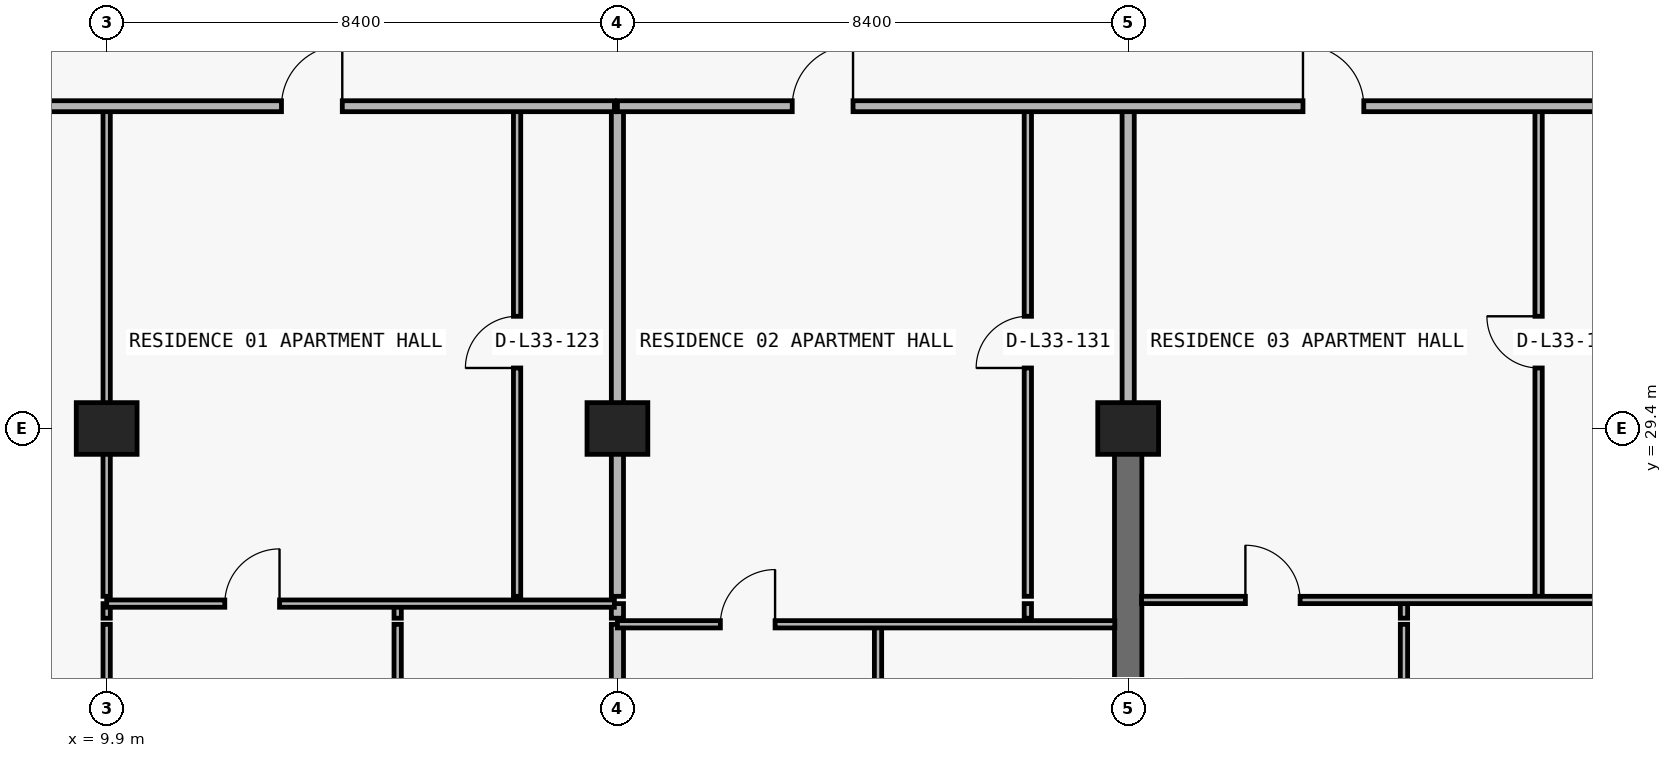
"""IFC4 building model, lengths in metres.
Left out: names, types, materials, properties, quantities, classifications, styles, units other than length and angle.
Written with IfcOpenShell. Run it as: python <this file> out.ifc"""

import sys

from ifc_helpers import new_model, si_unit, direction, frame, frame_2d, origin, origin_2d, place, context, subcontext, project, spatial, rectangle, extrude, element, fill, save


model = new_model("IFC4")
c1 = context("Model", 3, precision=1e-05, world=origin(), true_north=direction((0.0, 1.0)))
c2 = subcontext(c1, "Body", "Model", "MODEL_VIEW")
j1 = project(units=[si_unit("LENGTHUNIT", "METRE"), si_unit("PLANEANGLEUNIT", "RADIAN")], contexts=[c1])
p1 = place(None, origin())
s1 = spatial("IfcSite", under=j1, at=p1, CompositionType="ELEMENT")
p2 = place(p1, origin())
s2 = spatial("IfcBuilding", under=s1, at=p2, CompositionType="ELEMENT")
p3 = place(p2, frame((0.0, 0.0, 122.4)))
s3 = spatial("IfcBuildingStorey", under=s2, at=p3, CompositionType="ELEMENT", Elevation=122.4)
for number, where, z_axis, x_axis in (
    (1, (9.9, 29.4, 0.0), (0.0, 0.0, 1.0), (1.0, 0.0, 0.0)),
    (2, (18.3, 29.4, 0.0), (0.0, 0.0, 1.0), (1.0, 0.0, 0.0)),
    (3, (26.7, 29.4, 0.0), (0.0, 0.0, 1.0), (1.0, 0.0, 0.0)),
):
    element("IfcColumn", number, at=place(p3, frame(where, z_axis=z_axis, x_axis=x_axis)), inside=s3, PredefinedType="COLUMN", context=c2, shape_type="SweptSolid", body=[
        extrude(rectangle(XDim=1.0, YDim=0.85, at=origin_2d()), origin(), (0.0, 0.0, 1.0), 3.05),
    ])
p4 = place(p3, frame((26.7, 20.8, 0.0), z_axis=(0.0, 0.0, 1.0), x_axis=(0.0, 1.0, 0.0)))
e4 = element("IfcWall", 4, at=p4, inside=s3, PredefinedType="SHEAR", context=c2, shape_type="SweptSolid", body=[
    extrude(rectangle(XDim=8.6, YDim=0.45, at=frame_2d((4.3, 0.0))), origin(), (0.0, 0.0, 1.0), 3.05),
])
p5 = place(p3, frame((9.9, 21.49, 0.0), z_axis=(0.0, 0.0, 1.0), x_axis=(0.0, 1.0, 0.0)))
e5 = element("IfcWall", 5, at=p5, inside=s3, PredefinedType="PARTITIONING", context=c2, shape_type="SweptSolid", body=[
    extrude(rectangle(XDim=4.69, YDim=0.12, at=frame_2d((2.345, 0.0))), origin(), (0.0, 0.0, 1.0), 2.174),
])
p6 = place(p5, frame((1.895, 0.0, 0.0)))
e6 = element("IfcOpeningElement", 6, at=p6, cuts=e5, PredefinedType="OPENING", context=c2, shape_type="SweptSolid", body=[
    extrude(rectangle(XDim=0.9, YDim=2.124, at=frame_2d((0.45, 1.062))), frame((0.0, 0.07, 0.0), z_axis=(0.0, -1.0, 0.0), x_axis=(1.0, 0.0, 0.0)), (0.0, 0.0, 1.0), 0.14),
])
p7 = place(p3, frame((9.9, 26.28, 0.0), z_axis=(0.0, 0.0, 1.0), x_axis=(0.0, 1.0, 0.0)))
e7 = element("IfcWall", 7, at=p7, inside=s3, PredefinedType="PARTITIONING", context=c2, shape_type="SweptSolid", body=[
    extrude(rectangle(XDim=0.24, YDim=0.12, at=frame_2d((0.12, 0.0))), origin(), (0.0, 0.0, 1.0), 2.174),
])
p8 = place(p3, frame((9.9, 26.64, 0.0), z_axis=(0.0, 0.0, 1.0), x_axis=(0.0, 1.0, 0.0)))
e8 = element("IfcWall", 8, at=p8, inside=s3, PredefinedType="PARTITIONING", context=c2, shape_type="SweptSolid", body=[
    extrude(rectangle(XDim=8.06, YDim=0.12, at=frame_2d((4.03, 0.0))), origin(), (0.0, 0.0, 1.0), 2.174),
])
p9 = place(p3, frame((14.686, 21.49, 0.0), z_axis=(0.0, 0.0, 1.0), x_axis=(0.0, 1.0, 0.0)))
e9 = element("IfcWall", 9, at=p9, inside=s3, PredefinedType="PARTITIONING", context=c2, shape_type="SweptSolid", body=[
    extrude(rectangle(XDim=4.69, YDim=0.12, at=frame_2d((2.345, 0.0))), origin(), (0.0, 0.0, 1.0), 3.05),
])
p10 = place(p9, frame((1.895, 0.0, 0.0)))
e10 = element("IfcOpeningElement", 10, at=p10, cuts=e9, PredefinedType="OPENING", context=c2, shape_type="SweptSolid", body=[
    extrude(rectangle(XDim=0.9, YDim=2.15, at=frame_2d((0.45, 1.075))), frame((0.0, 0.07, 0.0), z_axis=(0.0, -1.0, 0.0), x_axis=(1.0, 0.0, 0.0)), (0.0, 0.0, 1.0), 0.14),
])
p11 = place(p3, frame((14.686, 26.28, 0.0), z_axis=(0.0, 0.0, 1.0), x_axis=(0.0, 1.0, 0.0)))
e11 = element("IfcWall", 11, at=p11, inside=s3, PredefinedType="PARTITIONING", context=c2, shape_type="SweptSolid", body=[
    extrude(rectangle(XDim=0.24, YDim=0.12, at=frame_2d((0.12, 0.0))), origin(), (0.0, 0.0, 1.0), 3.05),
])
p12 = place(p3, frame((16.65, 26.64, 0.0), z_axis=(0.0, 0.0, 1.0), x_axis=(0.0, 1.0, 0.0)))
e12 = element("IfcWall", 12, at=p12, inside=s3, PredefinedType="PARTITIONING", context=c2, shape_type="SweptSolid", body=[
    extrude(rectangle(XDim=8.06, YDim=0.12, at=frame_2d((4.03, 0.0))), origin(), (0.0, 0.0, 1.0), 3.05),
])
p13 = place(p12, frame((3.755, 0.0, 0.0)))
e13 = element("IfcOpeningElement", 13, at=p13, cuts=e12, PredefinedType="OPENING", context=c2, shape_type="SweptSolid", body=[
    extrude(rectangle(XDim=0.85, YDim=2.1, at=frame_2d((0.425, 1.05))), frame((0.0, 0.07, 0.0), z_axis=(0.0, -1.0, 0.0), x_axis=(1.0, 0.0, 0.0)), (0.0, 0.0, 1.0), 0.14),
])
p14 = place(p3, frame((18.3, 21.49, 0.0), z_axis=(0.0, 0.0, 1.0), x_axis=(0.0, 1.0, 0.0)))
e14 = element("IfcWall", 14, at=p14, inside=s3, PredefinedType="PARTITIONING", context=c2, shape_type="SweptSolid", body=[
    extrude(rectangle(XDim=4.69, YDim=0.2, at=frame_2d((2.345, 0.0))), origin(), (0.0, 0.0, 1.0), 2.174),
])
p15 = place(p3, frame((18.3, 26.28, 0.0), z_axis=(0.0, 0.0, 1.0), x_axis=(0.0, 1.0, 0.0)))
e15 = element("IfcWall", 15, at=p15, inside=s3, PredefinedType="PARTITIONING", context=c2, shape_type="SweptSolid", body=[
    extrude(rectangle(XDim=0.24, YDim=0.2, at=frame_2d((0.12, 0.0))), origin(), (0.0, 0.0, 1.0), 2.174),
])
p16 = place(p3, frame((18.3, 26.64, 0.0), z_axis=(0.0, 0.0, 1.0), x_axis=(0.0, 1.0, 0.0)))
e16 = element("IfcWall", 16, at=p16, inside=s3, PredefinedType="PARTITIONING", context=c2, shape_type="SweptSolid", body=[
    extrude(rectangle(XDim=8.06, YDim=0.2, at=frame_2d((4.03, 0.0))), origin(), (0.0, 0.0, 1.0), 2.174),
])
p17 = place(p3, frame((22.586, 21.49, 0.0), z_axis=(0.0, 0.0, 1.0), x_axis=(0.0, 1.0, 0.0)))
e17 = element("IfcWall", 17, at=p17, inside=s3, PredefinedType="PARTITIONING", context=c2, shape_type="SweptSolid", body=[
    extrude(rectangle(XDim=4.69, YDim=0.12, at=frame_2d((2.345, 0.0))), origin(), (0.0, 0.0, 1.0), 2.486),
])
p18 = place(p17, frame((1.895, 0.0, 0.0)))
e18 = element("IfcOpeningElement", 18, at=p18, cuts=e17, PredefinedType="OPENING", context=c2, shape_type="SweptSolid", body=[
    extrude(rectangle(XDim=0.9, YDim=2.15, at=frame_2d((0.45, 1.075))), frame((0.0, 0.07, 0.0), z_axis=(0.0, -1.0, 0.0), x_axis=(1.0, 0.0, 0.0)), (0.0, 0.0, 1.0), 0.14),
])
p19 = place(p3, frame((25.05, 26.28, 0.0), z_axis=(0.0, 0.0, 1.0), x_axis=(0.0, 1.0, 0.0)))
e19 = element("IfcWall", 19, at=p19, inside=s3, PredefinedType="PARTITIONING", context=c2, shape_type="SweptSolid", body=[
    extrude(rectangle(XDim=0.24, YDim=0.12, at=frame_2d((0.12, 0.0))), origin(), (0.0, 0.0, 1.0), 3.05),
])
p20 = place(p3, frame((25.05, 26.64, 0.0), z_axis=(0.0, 0.0, 1.0), x_axis=(0.0, 1.0, 0.0)))
e20 = element("IfcWall", 20, at=p20, inside=s3, PredefinedType="PARTITIONING", context=c2, shape_type="SweptSolid", body=[
    extrude(rectangle(XDim=8.06, YDim=0.12, at=frame_2d((4.03, 0.0))), origin(), (0.0, 0.0, 1.0), 3.05),
])
p21 = place(p20, frame((3.755, 0.0, 0.0)))
e21 = element("IfcOpeningElement", 21, at=p21, cuts=e20, PredefinedType="OPENING", context=c2, shape_type="SweptSolid", body=[
    extrude(rectangle(XDim=0.85, YDim=2.1, at=frame_2d((0.425, 1.05))), frame((0.0, 0.07, 0.0), z_axis=(0.0, -1.0, 0.0), x_axis=(1.0, 0.0, 0.0)), (0.0, 0.0, 1.0), 0.14),
])
p22 = place(p3, frame((26.7, 29.405, 0.0), z_axis=(0.0, 0.0, 1.0), x_axis=(0.0, 1.0, 0.0)))
e22 = element("IfcWall", 22, at=p22, inside=s3, PredefinedType="PARTITIONING", context=c2, shape_type="SweptSolid", body=[
    extrude(rectangle(XDim=5.295, YDim=0.2, at=frame_2d((2.647, 0.0))), origin(), (0.0, 0.0, 1.0), 2.335),
])
p23 = place(p3, frame((31.236, 21.49, 0.0), z_axis=(0.0, 0.0, 1.0), x_axis=(0.0, 1.0, 0.0)))
e23 = element("IfcWall", 23, at=p23, inside=s3, PredefinedType="PARTITIONING", context=c2, shape_type="SweptSolid", body=[
    extrude(rectangle(XDim=4.69, YDim=0.12, at=frame_2d((2.345, 0.0))), origin(), (0.0, 0.0, 1.0), 3.05),
])
p24 = place(p23, frame((1.895, 0.0, 0.0)))
e24 = element("IfcOpeningElement", 24, at=p24, cuts=e23, PredefinedType="OPENING", context=c2, shape_type="SweptSolid", body=[
    extrude(rectangle(XDim=0.9, YDim=2.15, at=frame_2d((0.45, 1.075))), frame((0.0, 0.07, 0.0), z_axis=(0.0, -1.0, 0.0), x_axis=(1.0, 0.0, 0.0)), (0.0, 0.0, 1.0), 0.14),
])
p25 = place(p3, frame((31.236, 26.28, 0.0), z_axis=(0.0, 0.0, 1.0), x_axis=(0.0, 1.0, 0.0)))
e25 = element("IfcWall", 25, at=p25, inside=s3, PredefinedType="PARTITIONING", context=c2, shape_type="SweptSolid", body=[
    extrude(rectangle(XDim=0.24, YDim=0.12, at=frame_2d((0.12, 0.0))), origin(), (0.0, 0.0, 1.0), 3.05),
])
p26 = place(p3, frame((33.45, 26.64, 0.0), z_axis=(0.0, 0.0, 1.0), x_axis=(0.0, 1.0, 0.0)))
e26 = element("IfcWall", 26, at=p26, inside=s3, PredefinedType="PARTITIONING", context=c2, shape_type="SweptSolid", body=[
    extrude(rectangle(XDim=8.06, YDim=0.12, at=frame_2d((4.03, 0.0))), origin(), (0.0, 0.0, 1.0), 3.05),
])
p27 = place(p26, frame((3.755, 0.0, 0.0)))
e27 = element("IfcOpeningElement", 27, at=p27, cuts=e26, PredefinedType="OPENING", context=c2, shape_type="SweptSolid", body=[
    extrude(rectangle(XDim=0.85, YDim=2.1, at=frame_2d((0.425, 1.05))), frame((0.0, 0.07, 0.0), z_axis=(0.0, -1.0, 0.0), x_axis=(1.0, 0.0, 0.0)), (0.0, 0.0, 1.0), 0.14),
])
p28 = place(p3, frame((18.3, 26.18, 0.0), z_axis=(0.0, 0.0, 1.0), x_axis=(1.0, 0.0, 0.0)))
e28 = element("IfcWall", 28, at=p28, inside=s3, PredefinedType="PARTITIONING", context=c2, shape_type="SweptSolid", body=[
    extrude(rectangle(XDim=8.18, YDim=0.12, at=frame_2d((4.09, 0.0))), origin(), (0.0, 0.0, 1.0), 3.05),
])
p29 = place(p28, frame((1.693, 0.0, 0.0)))
e29 = element("IfcOpeningElement", 29, at=p29, cuts=e28, PredefinedType="OPENING", context=c2, shape_type="SweptSolid", body=[
    extrude(rectangle(XDim=0.9, YDim=2.15, at=frame_2d((0.45, 1.075))), frame((0.0, 0.07, 0.0), z_axis=(0.0, -1.0, 0.0), x_axis=(1.0, 0.0, 0.0)), (0.0, 0.0, 1.0), 0.14),
])
p30 = place(p3, frame((9.9, 26.52, 0.0), z_axis=(0.0, 0.0, 1.0), x_axis=(1.0, 0.0, 0.0)))
e30 = element("IfcWall", 30, at=p30, inside=s3, PredefinedType="PARTITIONING", context=c2, shape_type="SweptSolid", body=[
    extrude(rectangle(XDim=8.35, YDim=0.12, at=frame_2d((4.175, 0.0))), origin(), (0.0, 0.0, 1.0), 3.05),
])
p31 = place(p30, frame((1.943, 0.0, 0.0)))
e31 = element("IfcOpeningElement", 31, at=p31, cuts=e30, PredefinedType="OPENING", context=c2, shape_type="SweptSolid", body=[
    extrude(rectangle(XDim=0.9, YDim=2.15, at=frame_2d((0.45, 1.075))), frame((0.0, 0.07, 0.0), z_axis=(0.0, -1.0, 0.0), x_axis=(1.0, 0.0, 0.0)), (0.0, 0.0, 1.0), 0.14),
])
p32 = place(p3, frame((26.92, 26.58, 0.0), z_axis=(0.0, 0.0, 1.0), x_axis=(1.0, 0.0, 0.0)))
e32 = element("IfcWall", 32, at=p32, inside=s3, PredefinedType="PARTITIONING", context=c2, shape_type="SweptSolid", body=[
    extrude(rectangle(XDim=8.18, YDim=0.12, at=frame_2d((4.09, 0.0))), origin(), (0.0, 0.0, 1.0), 3.05),
])
p33 = place(p32, frame((1.708, 0.0, 0.0)))
e33 = element("IfcOpeningElement", 33, at=p33, cuts=e32, PredefinedType="OPENING", context=c2, shape_type="SweptSolid", body=[
    extrude(rectangle(XDim=0.9, YDim=2.15, at=frame_2d((0.45, 1.075))), frame((0.0, 0.07, 0.0), z_axis=(0.0, -1.0, 0.0), x_axis=(1.0, 0.0, 0.0)), (0.0, 0.0, 1.0), 0.14),
])
p34 = place(p3, frame((7.705, 34.7, 0.0), z_axis=(0.0, 0.0, 1.0), x_axis=(1.0, 0.0, 0.0)))
e34 = element("IfcWall", 34, at=p34, inside=s3, PredefinedType="PARTITIONING", context=c2, shape_type="SweptSolid", body=[
    extrude(rectangle(XDim=10.545, YDim=0.18, at=frame_2d((5.272, 0.0))), origin(), (0.0, 0.0, 1.0), 3.05),
])
p35 = place(p34, frame((5.07, 0.0, 0.0)))
e35 = element("IfcOpeningElement", 35, at=p35, cuts=e34, PredefinedType="OPENING", context=c2, shape_type="SweptSolid", body=[
    extrude(rectangle(XDim=1.0, YDim=2.2, at=frame_2d((0.5, 1.1))), frame((0.0, 0.1, 0.0), z_axis=(0.0, -1.0, 0.0), x_axis=(1.0, 0.0, 0.0)), (0.0, 0.0, 1.0), 0.2),
])
p36 = place(p3, frame((18.3, 34.7, 0.0), z_axis=(0.0, 0.0, 1.0), x_axis=(1.0, 0.0, 0.0)))
e36 = element("IfcWall", 36, at=p36, inside=s3, PredefinedType="PARTITIONING", context=c2, shape_type="SweptSolid", body=[
    extrude(rectangle(XDim=41.2, YDim=0.18, at=frame_2d((20.6, 0.0))), origin(), (0.0, 0.0, 1.0), 3.05),
])
p37 = place(p36, frame((2.875, 0.0, 0.0)))
e37 = element("IfcOpeningElement", 37, at=p37, cuts=e36, PredefinedType="OPENING", context=c2, shape_type="SweptSolid", body=[
    extrude(rectangle(XDim=1.0, YDim=2.2, at=frame_2d((0.5, 1.1))), frame((0.0, 0.1, 0.0), z_axis=(0.0, -1.0, 0.0), x_axis=(1.0, 0.0, 0.0)), (0.0, 0.0, 1.0), 0.2),
])
p38 = place(p36, frame((11.275, 0.0, 0.0)))
e38 = element("IfcOpeningElement", 38, at=p38, cuts=e36, PredefinedType="OPENING", context=c2, shape_type="SweptSolid", body=[
    extrude(rectangle(XDim=1.0, YDim=2.2, at=frame_2d((0.5, 1.1))), frame((0.0, 0.1, 0.0), z_axis=(0.0, -1.0, 0.0), x_axis=(1.0, 0.0, 0.0)), (0.0, 0.0, 1.0), 0.2),
])
p39 = place(p36, frame((19.275, 0.0, 0.0)))
e39 = element("IfcOpeningElement", 39, at=p39, cuts=e36, PredefinedType="OPENING", context=c2, shape_type="SweptSolid", body=[
    extrude(rectangle(XDim=1.0, YDim=2.2, at=frame_2d((0.5, 1.1))), frame((0.0, 0.1, 0.0), z_axis=(0.0, -1.0, 0.0), x_axis=(1.0, 0.0, 0.0)), (0.0, 0.0, 1.0), 0.2),
])
p40 = place(p36, frame((27.275, 0.0, 0.0)))
e40 = element("IfcOpeningElement", 40, at=p40, cuts=e36, PredefinedType="OPENING", context=c2, shape_type="SweptSolid", body=[
    extrude(rectangle(XDim=1.0, YDim=2.2, at=frame_2d((0.5, 1.1))), frame((0.0, 0.1, 0.0), z_axis=(0.0, -1.0, 0.0), x_axis=(1.0, 0.0, 0.0)), (0.0, 0.0, 1.0), 0.2),
])
p41 = place(p36, frame((35.675, 0.0, 0.0)))
e41 = element("IfcOpeningElement", 41, at=p41, cuts=e36, PredefinedType="OPENING", context=c2, shape_type="SweptSolid", body=[
    extrude(rectangle(XDim=1.0, YDim=2.2, at=frame_2d((0.5, 1.1))), frame((0.0, 0.1, 0.0), z_axis=(0.0, -1.0, 0.0), x_axis=(1.0, 0.0, 0.0)), (0.0, 0.0, 1.0), 0.2),
])
p42 = place(p35, origin())
e42 = element("IfcDoor", 42, at=p42, inside=s3, OperationType="SINGLE_SWING_RIGHT", PredefinedType="DOOR", context=c2, shape_type="SweptSolid", body=[
    extrude(rectangle(XDim=1.0, YDim=2.2, at=frame_2d((0.5, 1.1))), frame((0.0, 0.025, 0.0), z_axis=(0.0, -1.0, 0.0), x_axis=(1.0, 0.0, 0.0)), (0.0, 0.0, 1.0), 0.05),
])
fill(e35, e42)
p43 = place(p13, origin())
e43 = element("IfcDoor", 43, at=p43, inside=s3, OperationType="SINGLE_SWING_LEFT", PredefinedType="DOOR", context=c2, shape_type="SweptSolid", body=[
    extrude(rectangle(XDim=0.85, YDim=2.1, at=frame_2d((0.425, 1.05))), frame((0.0, 0.025, 0.0), z_axis=(0.0, -1.0, 0.0), x_axis=(1.0, 0.0, 0.0)), (0.0, 0.0, 1.0), 0.05),
])
fill(e13, e43)
p44 = place(p31, origin())
e44 = element("IfcDoor", 44, at=p44, inside=s3, OperationType="SINGLE_SWING_RIGHT", PredefinedType="DOOR", context=c2, shape_type="SweptSolid", body=[
    extrude(rectangle(XDim=0.9, YDim=2.15, at=frame_2d((0.45, 1.075))), frame((0.0, 0.025, 0.0), z_axis=(0.0, -1.0, 0.0), x_axis=(1.0, 0.0, 0.0)), (0.0, 0.0, 1.0), 0.05),
])
fill(e31, e44)
p45 = place(p37, origin())
e45 = element("IfcDoor", 45, at=p45, inside=s3, OperationType="SINGLE_SWING_RIGHT", PredefinedType="DOOR", context=c2, shape_type="SweptSolid", body=[
    extrude(rectangle(XDim=1.0, YDim=2.2, at=frame_2d((0.5, 1.1))), frame((0.0, 0.025, 0.0), z_axis=(0.0, -1.0, 0.0), x_axis=(1.0, 0.0, 0.0)), (0.0, 0.0, 1.0), 0.05),
])
fill(e37, e45)
p46 = place(p21, origin())
e46 = element("IfcDoor", 46, at=p46, inside=s3, OperationType="SINGLE_SWING_LEFT", PredefinedType="DOOR", context=c2, shape_type="SweptSolid", body=[
    extrude(rectangle(XDim=0.85, YDim=2.1, at=frame_2d((0.425, 1.05))), frame((0.0, 0.025, 0.0), z_axis=(0.0, -1.0, 0.0), x_axis=(1.0, 0.0, 0.0)), (0.0, 0.0, 1.0), 0.05),
])
fill(e21, e46)
p47 = place(p29, origin())
e47 = element("IfcDoor", 47, at=p47, inside=s3, OperationType="SINGLE_SWING_RIGHT", PredefinedType="DOOR", context=c2, shape_type="SweptSolid", body=[
    extrude(rectangle(XDim=0.9, YDim=2.15, at=frame_2d((0.45, 1.075))), frame((0.0, 0.025, 0.0), z_axis=(0.0, -1.0, 0.0), x_axis=(1.0, 0.0, 0.0)), (0.0, 0.0, 1.0), 0.05),
])
fill(e29, e47)
p48 = place(p38, origin())
e48 = element("IfcDoor", 48, at=p48, inside=s3, OperationType="SINGLE_SWING_LEFT", PredefinedType="DOOR", context=c2, shape_type="SweptSolid", body=[
    extrude(rectangle(XDim=1.0, YDim=2.2, at=frame_2d((0.5, 1.1))), frame((0.0, 0.025, 0.0), z_axis=(0.0, -1.0, 0.0), x_axis=(1.0, 0.0, 0.0)), (0.0, 0.0, 1.0), 0.05),
])
fill(e38, e48)
p49 = place(p27, origin())
e49 = element("IfcDoor", 49, at=p49, inside=s3, OperationType="SINGLE_SWING_RIGHT", PredefinedType="DOOR", context=c2, shape_type="SweptSolid", body=[
    extrude(rectangle(XDim=0.85, YDim=2.1, at=frame_2d((0.425, 1.05))), frame((0.0, 0.025, 0.0), z_axis=(0.0, -1.0, 0.0), x_axis=(1.0, 0.0, 0.0)), (0.0, 0.0, 1.0), 0.05),
])
fill(e27, e49)
p50 = place(p33, origin())
e50 = element("IfcDoor", 50, at=p50, inside=s3, OperationType="SINGLE_SWING_LEFT", PredefinedType="DOOR", context=c2, shape_type="SweptSolid", body=[
    extrude(rectangle(XDim=0.9, YDim=2.15, at=frame_2d((0.45, 1.075))), frame((0.0, 0.025, 0.0), z_axis=(0.0, -1.0, 0.0), x_axis=(1.0, 0.0, 0.0)), (0.0, 0.0, 1.0), 0.05),
])
fill(e33, e50)
save(model, sys.argv[1])
